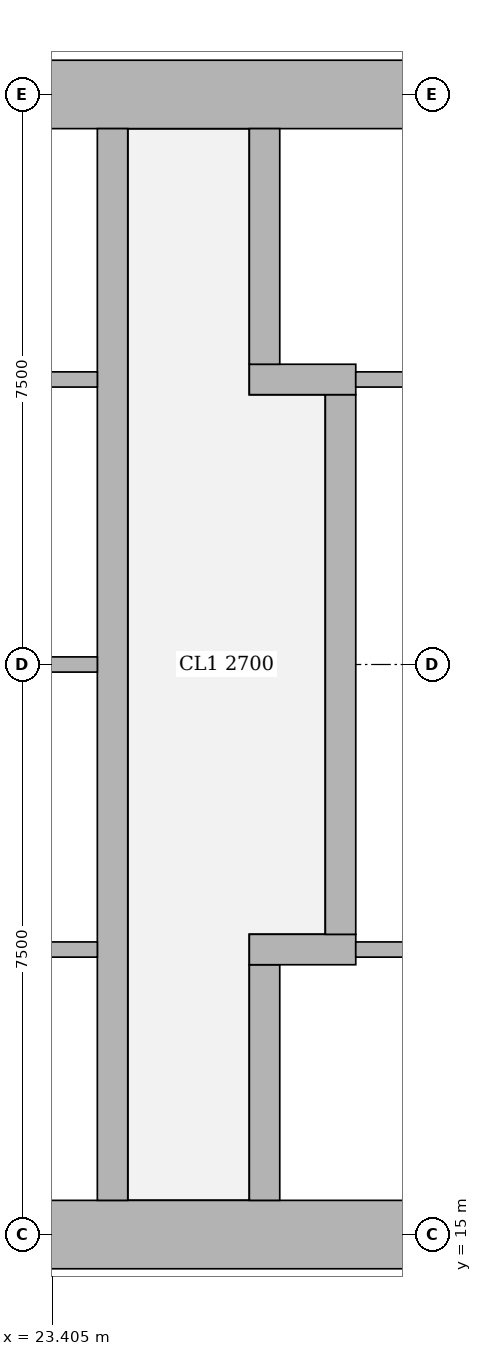
"""IFC4 building model, lengths in metres.
Left out: names, types, materials, properties, quantities, classifications, styles, units other than length and angle.
Written with IfcOpenShell. Run it as: python <this file> out.ifc"""

import sys

from ifc_helpers import new_model, si_unit, direction, frame, frame_2d, origin, place, context, subcontext, project, spatial, rectangle, extrude, element, fill, save


model = new_model("IFC4")
c1 = context("Model", 3, precision=1e-05, world=origin(), true_north=direction((0.0, 1.0)))
c2 = subcontext(c1, "Body", "Model", "MODEL_VIEW")
j1 = project(units=[si_unit("LENGTHUNIT", "METRE"), si_unit("PLANEANGLEUNIT", "RADIAN")], contexts=[c1])
p1 = place(None, origin())
s1 = spatial("IfcSite", under=j1, at=p1, CompositionType="ELEMENT")
p2 = place(p1, origin())
s2 = spatial("IfcBuilding", under=s1, at=p2, CompositionType="ELEMENT")
p3 = place(p2, frame((0.0, 0.0, 251.6)))
s3 = spatial("IfcBuildingStorey", under=s2, at=p3, CompositionType="ELEMENT", Elevation=251.6)
p4 = place(p3, frame((13.95, 15.0, 0.0), z_axis=(0.0, 0.0, 1.0), x_axis=(1.0, 0.0, 0.0)))
e1 = element("IfcWall", 1, at=p4, inside=s3, PredefinedType="SHEAR", context=c2, shape_type="SweptSolid", body=[
    extrude(rectangle(XDim=15.3, YDim=0.9, at=frame_2d((7.65, 0.0))), origin(), (0.0, 0.0, 1.0), 3.75),
])
p5 = place(p4, frame((4.45, 0.0, 0.0)))
e2 = element("IfcOpeningElement", 2, at=p5, cuts=e1, PredefinedType="OPENING", context=c2, shape_type="SweptSolid", body=[
    extrude(rectangle(XDim=1.8, YDim=2.1, at=frame_2d((0.9, 1.05))), frame((0.0, 0.46, 0.0), z_axis=(0.0, -1.0, 0.0), x_axis=(1.0, 0.0, 0.0)), (0.0, 0.0, 1.0), 0.92),
])
p6 = place(p4, frame((10.7, 0.0, 0.0)))
e3 = element("IfcOpeningElement", 3, at=p6, cuts=e1, PredefinedType="OPENING", context=c2, shape_type="SweptSolid", body=[
    extrude(rectangle(XDim=1.1, YDim=2.1, at=frame_2d((0.55, 1.05))), frame((0.0, 0.46, 0.0), z_axis=(0.0, -1.0, 0.0), x_axis=(1.0, 0.0, 0.0)), (0.0, 0.0, 1.0), 0.92),
])
p7 = place(p3, frame((13.95, 30.0, 0.0), z_axis=(0.0, 0.0, 1.0), x_axis=(1.0, 0.0, 0.0)))
e4 = element("IfcWall", 4, at=p7, inside=s3, PredefinedType="SHEAR", context=c2, shape_type="SweptSolid", body=[
    extrude(rectangle(XDim=15.3, YDim=0.9, at=frame_2d((7.65, 0.0))), origin(), (0.0, 0.0, 1.0), 3.75),
])
p8 = place(p7, frame((4.45, 0.0, 0.0)))
e5 = element("IfcOpeningElement", 5, at=p8, cuts=e4, PredefinedType="OPENING", context=c2, shape_type="SweptSolid", body=[
    extrude(rectangle(XDim=1.8, YDim=2.1, at=frame_2d((0.9, 1.05))), frame((0.0, 0.46, 0.0), z_axis=(0.0, -1.0, 0.0), x_axis=(1.0, 0.0, 0.0)), (0.0, 0.0, 1.0), 0.92),
])
p9 = place(p7, frame((10.7, 0.0, 0.0)))
e6 = element("IfcOpeningElement", 6, at=p9, cuts=e4, PredefinedType="OPENING", context=c2, shape_type="SweptSolid", body=[
    extrude(rectangle(XDim=1.1, YDim=2.1, at=frame_2d((0.55, 1.05))), frame((0.0, 0.46, 0.0), z_axis=(0.0, -1.0, 0.0), x_axis=(1.0, 0.0, 0.0)), (0.0, 0.0, 1.0), 0.92),
])
p10 = place(p3, frame((24.2, 15.45, 0.0), z_axis=(0.0, 0.0, 1.0), x_axis=(0.0, 1.0, 0.0)))
e7 = element("IfcWall", 7, at=p10, inside=s3, PredefinedType="SHEAR", context=c2, shape_type="SweptSolid", body=[
    extrude(rectangle(XDim=14.1, YDim=0.4, at=frame_2d((7.05, 0.0))), origin(), (0.0, 0.0, 1.0), 3.75),
])
p11 = place(p3, frame((26.2, 15.45, 0.0), z_axis=(0.0, 0.0, 1.0), x_axis=(0.0, 1.0, 0.0)))
e8 = element("IfcWall", 8, at=p11, inside=s3, PredefinedType="SHEAR", context=c2, shape_type="SweptSolid", body=[
    extrude(rectangle(XDim=3.1, YDim=0.4, at=frame_2d((1.55, 0.0))), origin(), (0.0, 0.0, 1.0), 3.75),
])
p12 = place(p11, frame((0.825, 0.0, 0.0)))
e9 = element("IfcOpeningElement", 9, at=p12, cuts=e8, PredefinedType="OPENING", context=c2, shape_type="SweptSolid", body=[
    extrude(rectangle(XDim=1.2, YDim=2.1, at=frame_2d((0.6, 1.05))), frame((0.0, 0.21, 0.0), z_axis=(0.0, -1.0, 0.0), x_axis=(1.0, 0.0, 0.0)), (0.0, 0.0, 1.0), 0.42),
])
p13 = place(p3, frame((26.0, 18.75, 0.0), z_axis=(0.0, 0.0, 1.0), x_axis=(1.0, 0.0, 0.0)))
e10 = element("IfcWall", 10, at=p13, inside=s3, PredefinedType="SHEAR", context=c2, shape_type="SweptSolid", body=[
    extrude(rectangle(XDim=1.4, YDim=0.4, at=frame_2d((0.7, 0.0))), origin(), (0.0, 0.0, 1.0), 3.75),
])
p14 = place(p3, frame((27.2, 18.95, 0.0), z_axis=(0.0, 0.0, 1.0), x_axis=(0.0, 1.0, 0.0)))
e11 = element("IfcWall", 11, at=p14, inside=s3, PredefinedType="SHEAR", context=c2, shape_type="SweptSolid", body=[
    extrude(rectangle(XDim=7.1, YDim=0.4, at=frame_2d((3.55, 0.0))), origin(), (0.0, 0.0, 1.0), 3.75),
])
p15 = place(p3, frame((26.0, 26.25, 0.0), z_axis=(0.0, 0.0, 1.0), x_axis=(1.0, 0.0, 0.0)))
e12 = element("IfcWall", 12, at=p15, inside=s3, PredefinedType="SHEAR", context=c2, shape_type="SweptSolid", body=[
    extrude(rectangle(XDim=1.4, YDim=0.4, at=frame_2d((0.7, 0.0))), origin(), (0.0, 0.0, 1.0), 3.75),
])
p16 = place(p3, frame((26.2, 26.45, 0.0), z_axis=(0.0, 0.0, 1.0), x_axis=(0.0, 1.0, 0.0)))
e13 = element("IfcWall", 13, at=p16, inside=s3, PredefinedType="SHEAR", context=c2, shape_type="SweptSolid", body=[
    extrude(rectangle(XDim=3.1, YDim=0.4, at=frame_2d((1.55, 0.0))), origin(), (0.0, 0.0, 1.0), 3.75),
])
p17 = place(p16, frame((1.075, 0.0, 0.0)))
e14 = element("IfcOpeningElement", 14, at=p17, cuts=e13, PredefinedType="OPENING", context=c2, shape_type="SweptSolid", body=[
    extrude(rectangle(XDim=1.2, YDim=2.1, at=frame_2d((0.6, 1.05))), frame((0.0, 0.21, 0.0), z_axis=(0.0, -1.0, 0.0), x_axis=(1.0, 0.0, 0.0)), (0.0, 0.0, 1.0), 0.42),
])
for number, where, z_axis, x_axis in (
    (15, (21.8, 18.75, 0.0), (0.0, 0.0, 1.0), (1.0, 0.0, 0.0)),
    (16, (21.8, 22.5, 0.0), (0.0, 0.0, 1.0), (1.0, 0.0, 0.0)),
    (17, (21.8, 26.25, 0.0), (0.0, 0.0, 1.0), (1.0, 0.0, 0.0)),
):
    element("IfcWall", number, at=place(p3, frame(where, z_axis=z_axis, x_axis=x_axis)), inside=s3, PredefinedType="SOLIDWALL", context=c2, shape_type="SweptSolid", body=[
        extrude(rectangle(XDim=2.2, YDim=0.2, at=frame_2d((1.1, 0.0))), origin(), (0.0, 0.0, 1.0), 3.5),
    ])
for number, where, z_axis, x_axis in (
    (18, (27.4, 18.75, 0.0), (0.0, 0.0, 1.0), (1.0, 0.0, 0.0)),
    (19, (27.4, 26.25, 0.0), (0.0, 0.0, 1.0), (1.0, 0.0, 0.0)),
):
    element("IfcWall", number, at=place(p3, frame(where, z_axis=z_axis, x_axis=x_axis)), inside=s3, PredefinedType="SOLIDWALL", context=c2, shape_type="SweptSolid", body=[
        extrude(rectangle(XDim=0.95, YDim=0.2, at=frame_2d((0.475, 0.0))), origin(), (0.0, 0.0, 1.0), 3.5),
    ])
p18 = place(p6, origin())
e20 = element("IfcDoor", 20, at=p18, inside=s3, OperationType="SINGLE_SWING_LEFT", PredefinedType="DOOR", context=c2, shape_type="SweptSolid", body=[
    extrude(rectangle(XDim=1.1, YDim=2.1, at=frame_2d((0.55, 1.05))), frame((0.0, 0.025, 0.0), z_axis=(0.0, -1.0, 0.0), x_axis=(1.0, 0.0, 0.0)), (0.0, 0.0, 1.0), 0.05),
])
fill(e3, e20)
p19 = place(p9, origin())
e21 = element("IfcDoor", 21, at=p19, inside=s3, OperationType="SINGLE_SWING_LEFT", PredefinedType="DOOR", context=c2, shape_type="SweptSolid", body=[
    extrude(rectangle(XDim=1.1, YDim=2.1, at=frame_2d((0.55, 1.05))), frame((0.0, 0.025, 0.0), z_axis=(0.0, -1.0, 0.0), x_axis=(1.0, 0.0, 0.0)), (0.0, 0.0, 1.0), 0.05),
])
fill(e6, e21)
p20 = place(p12, origin())
e22 = element("IfcDoor", 22, at=p20, inside=s3, OperationType="DOUBLE_DOOR_SLIDING", PredefinedType="DOOR", context=c2, shape_type="SweptSolid", body=[
    extrude(rectangle(XDim=1.2, YDim=2.1, at=frame_2d((0.6, 1.05))), frame((0.0, 0.025, 0.0), z_axis=(0.0, -1.0, 0.0), x_axis=(1.0, 0.0, 0.0)), (0.0, 0.0, 1.0), 0.05),
])
fill(e9, e22)
p21 = place(p17, origin())
e23 = element("IfcDoor", 23, at=p21, inside=s3, OperationType="DOUBLE_DOOR_SLIDING", PredefinedType="DOOR", context=c2, shape_type="SweptSolid", body=[
    extrude(rectangle(XDim=1.2, YDim=2.1, at=frame_2d((0.6, 1.05))), frame((0.0, 0.025, 0.0), z_axis=(0.0, -1.0, 0.0), x_axis=(1.0, 0.0, 0.0)), (0.0, 0.0, 1.0), 0.05),
])
fill(e14, e23)
save(model, sys.argv[1])
